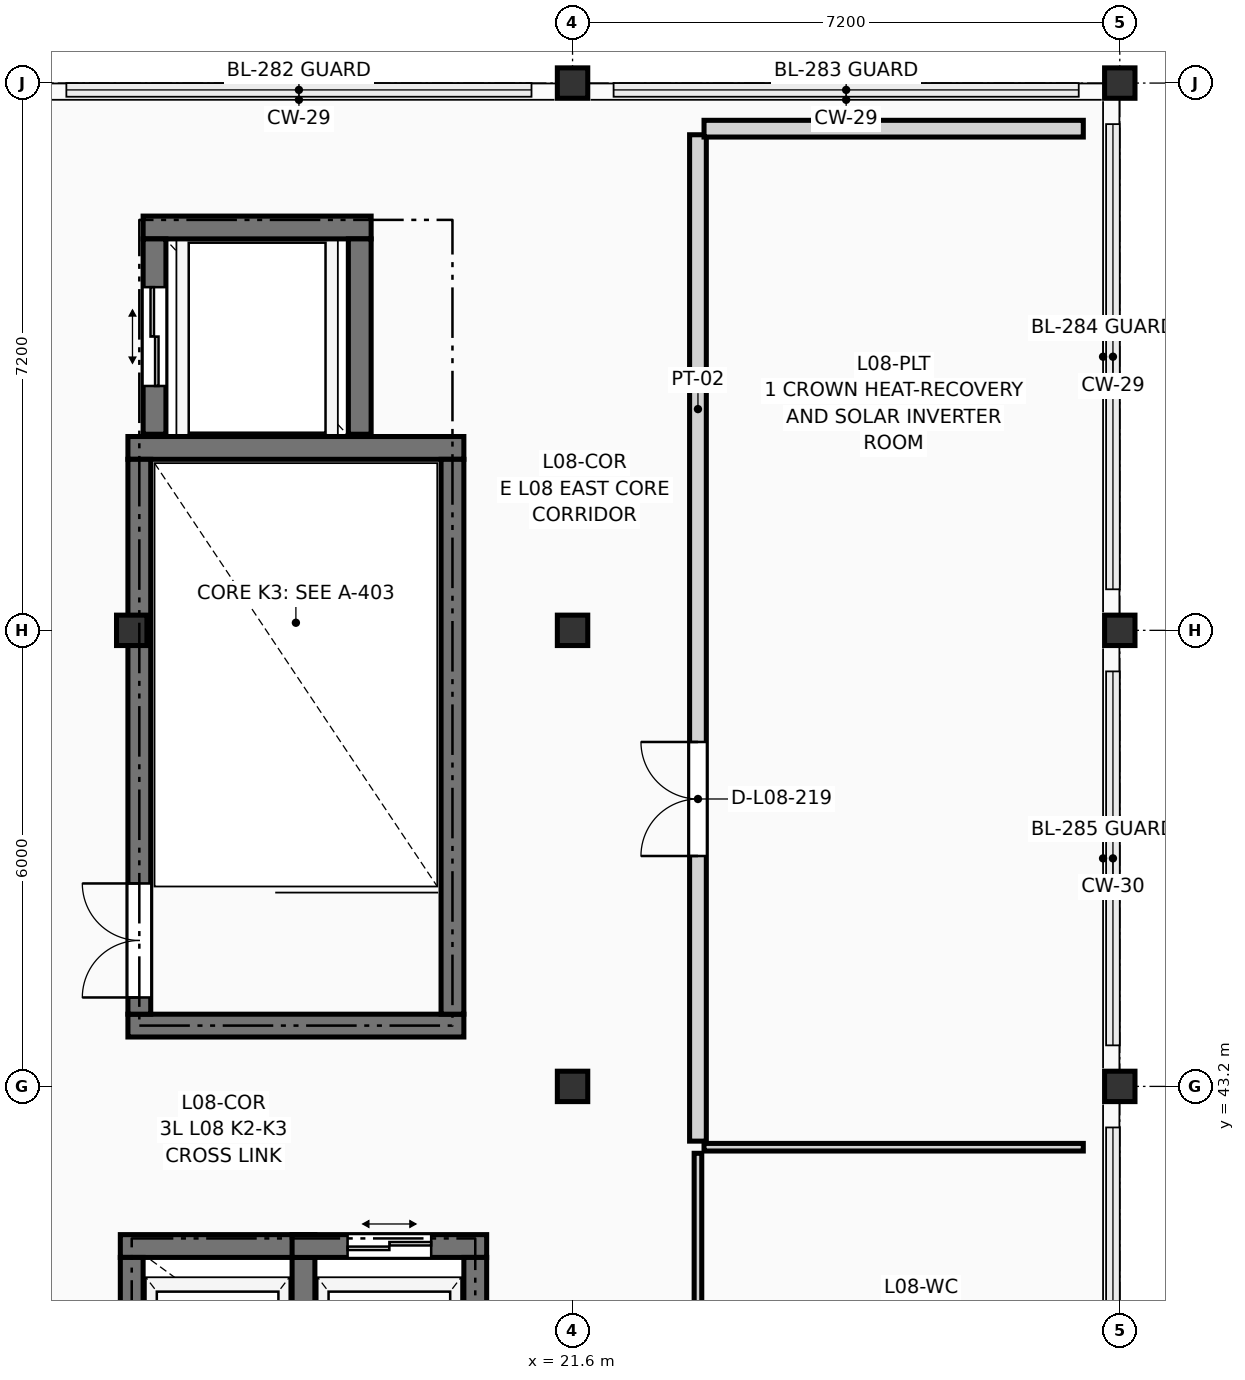
"""IFC4 building model, lengths in metres.
Left out: names, types, materials, properties, quantities, classifications, styles, units other than length and angle.
Written with IfcOpenShell. Run it as: python <this file> out.ifc"""

import sys

from ifc_helpers import new_model, si_unit, direction, frame, frame_2d, origin, origin_2d, place, context, subcontext, project, spatial, rectangle, extrude, element, fill, save


model = new_model("IFC4")
c1 = context("Model", 3, precision=1e-05, world=origin(), true_north=direction((0.0, 1.0)))
c2 = subcontext(c1, "Body", "Model", "MODEL_VIEW")
j1 = project(units=[si_unit("LENGTHUNIT", "METRE"), si_unit("PLANEANGLEUNIT", "RADIAN")], contexts=[c1])
p1 = place(None, origin())
s1 = spatial("IfcSite", under=j1, at=p1, CompositionType="ELEMENT")
p2 = place(p1, origin())
s2 = spatial("IfcBuilding", under=s1, at=p2, CompositionType="ELEMENT")
p3 = place(p2, frame((0.0, 0.0, 29.7)))
s3 = spatial("IfcBuildingStorey", under=s2, at=p3, CompositionType="ELEMENT", Elevation=29.7)
for number, where, z_axis, x_axis in (
    (1, (15.8, 49.2, 0.0), (0.0, 0.0, 1.0), (1.0, 0.0, 0.0)),
    (2, (21.6, 43.2, 0.0), (0.0, 0.0, 1.0), (1.0, 0.0, 0.0)),
    (3, (21.6, 49.2, 0.0), (0.0, 0.0, 1.0), (1.0, 0.0, 0.0)),
    (4, (21.6, 56.4, 0.0), (0.0, 0.0, 1.0), (1.0, 0.0, 0.0)),
    (5, (28.8, 43.2, 0.0), (0.0, 0.0, 1.0), (1.0, 0.0, 0.0)),
    (6, (28.8, 49.2, 0.0), (0.0, 0.0, 1.0), (1.0, 0.0, 0.0)),
    (7, (28.8, 56.4, 0.0), (0.0, 0.0, 1.0), (1.0, 0.0, 0.0)),
):
    element("IfcColumn", number, at=place(p3, frame(where, z_axis=z_axis, x_axis=x_axis)), inside=s3, PredefinedType="COLUMN", context=c2, shape_type="SweptSolid", body=[
        extrude(rectangle(XDim=0.4, YDim=0.4, at=origin_2d()), origin(), (0.0, 0.0, 1.0), 3.6),
    ])
for number, where, z_axis, x_axis in (
    (8, (15.75, 44.0, 0.0), (0.0, 0.0, 1.0), (1.0, 0.0, 0.0)),
    (9, (15.75, 51.6, 0.0), (0.0, 0.0, 1.0), (1.0, 0.0, 0.0)),
):
    element("IfcWall", number, at=place(p3, frame(where, z_axis=z_axis, x_axis=x_axis)), inside=s3, PredefinedType="SHEAR", context=c2, shape_type="SweptSolid", body=[
        extrude(rectangle(XDim=4.42, YDim=0.3, at=frame_2d((2.21, 0.0))), origin(), (0.0, 0.0, 1.0), 3.4),
    ])
p4 = place(p3, frame((15.9, 44.15, 0.0), z_axis=(0.0, 0.0, 1.0), x_axis=(0.0, 1.0, 0.0)))
e10 = element("IfcWall", 10, at=p4, inside=s3, PredefinedType="SHEAR", context=c2, shape_type="SweptSolid", body=[
    extrude(rectangle(XDim=7.3, YDim=0.3, at=frame_2d((3.65, 0.0))), origin(), (0.0, 0.0, 1.0), 3.4),
])
p5 = place(p4, frame((0.22, 0.0, 0.0)))
e11 = element("IfcOpeningElement", 11, at=p5, cuts=e10, PredefinedType="OPENING", context=c2, shape_type="SweptSolid", body=[
    extrude(rectangle(XDim=1.5, YDim=2.2, at=frame_2d((0.75, 1.1))), frame((0.0, 0.162, 0.0), z_axis=(0.0, -1.0, 0.0), x_axis=(1.0, 0.0, 0.0)), (0.0, 0.0, 1.0), 0.324),
])
p6 = place(p3, frame((20.02, 44.15, 0.0), z_axis=(0.0, 0.0, 1.0), x_axis=(0.0, 1.0, 0.0)))
e12 = element("IfcWall", 12, at=p6, inside=s3, PredefinedType="SHEAR", context=c2, shape_type="SweptSolid", body=[
    extrude(rectangle(XDim=7.3, YDim=0.3, at=frame_2d((3.65, 0.0))), origin(), (0.0, 0.0, 1.0), 3.4),
])
p7 = place(p3, frame((15.65, 41.1, 0.0), z_axis=(0.0, 0.0, 1.0), x_axis=(1.0, 0.0, 0.0)))
e13 = element("IfcWall", 13, at=p7, inside=s3, PredefinedType="SHEAR", context=c2, shape_type="SweptSolid", body=[
    extrude(rectangle(XDim=2.56, YDim=0.3, at=frame_2d((1.28, 0.0))), origin(), (0.0, 0.0, 1.0), 3.4),
])
p8 = place(p3, frame((15.8, 37.98, 0.0), z_axis=(0.0, 0.0, 1.0), x_axis=(0.0, 1.0, 0.0)))
e14 = element("IfcWall", 14, at=p8, inside=s3, PredefinedType="SHEAR", context=c2, shape_type="SweptSolid", body=[
    extrude(rectangle(XDim=2.97, YDim=0.3, at=frame_2d((1.485, 0.0))), origin(), (0.0, 0.0, 1.0), 3.4),
])
p9 = place(p8, frame((0.935, 0.0, 0.0)))
e15 = element("IfcOpeningElement", 15, at=p9, cuts=e14, PredefinedType="OPENING", context=c2, shape_type="SweptSolid", body=[
    extrude(rectangle(XDim=1.1, YDim=2.2, at=frame_2d((0.55, 1.1))), frame((0.0, 0.162, 0.0), z_axis=(0.0, -1.0, 0.0), x_axis=(1.0, 0.0, 0.0)), (0.0, 0.0, 1.0), 0.324),
])
p10 = place(p3, frame((18.06, 37.98, 0.0), z_axis=(0.0, 0.0, 1.0), x_axis=(0.0, 1.0, 0.0)))
e16 = element("IfcWall", 16, at=p10, inside=s3, PredefinedType="SHEAR", context=c2, shape_type="SweptSolid", body=[
    extrude(rectangle(XDim=2.97, YDim=0.3, at=frame_2d((1.485, 0.0))), origin(), (0.0, 0.0, 1.0), 3.4),
])
p11 = place(p3, frame((17.91, 41.1, 0.0), z_axis=(0.0, 0.0, 1.0), x_axis=(1.0, 0.0, 0.0)))
e17 = element("IfcWall", 17, at=p11, inside=s3, PredefinedType="SHEAR", context=c2, shape_type="SweptSolid", body=[
    extrude(rectangle(XDim=2.56, YDim=0.3, at=frame_2d((1.28, 0.0))), origin(), (0.0, 0.0, 1.0), 3.4),
])
p12 = place(p11, frame((0.73, 0.0, 0.0)))
e18 = element("IfcOpeningElement", 18, at=p12, cuts=e17, PredefinedType="OPENING", context=c2, shape_type="SweptSolid", body=[
    extrude(rectangle(XDim=1.1, YDim=2.2, at=frame_2d((0.55, 1.1))), frame((0.0, 0.162, 0.0), z_axis=(0.0, -1.0, 0.0), x_axis=(1.0, 0.0, 0.0)), (0.0, 0.0, 1.0), 0.324),
])
p13 = place(p3, frame((20.32, 37.98, 0.0), z_axis=(0.0, 0.0, 1.0), x_axis=(0.0, 1.0, 0.0)))
e19 = element("IfcWall", 19, at=p13, inside=s3, PredefinedType="SHEAR", context=c2, shape_type="SweptSolid", body=[
    extrude(rectangle(XDim=2.97, YDim=0.3, at=frame_2d((1.485, 0.0))), origin(), (0.0, 0.0, 1.0), 3.4),
])
p14 = place(p3, frame((15.95, 54.5, 0.0), z_axis=(0.0, 0.0, 1.0), x_axis=(1.0, 0.0, 0.0)))
e20 = element("IfcWall", 20, at=p14, inside=s3, PredefinedType="SHEAR", context=c2, shape_type="SweptSolid", body=[
    extrude(rectangle(XDim=3.0, YDim=0.3, at=frame_2d((1.5, 0.0))), origin(), (0.0, 0.0, 1.0), 3.4),
])
p15 = place(p3, frame((16.1, 51.78, 0.0), z_axis=(0.0, 0.0, 1.0), x_axis=(0.0, 1.0, 0.0)))
e21 = element("IfcWall", 21, at=p15, inside=s3, PredefinedType="SHEAR", context=c2, shape_type="SweptSolid", body=[
    extrude(rectangle(XDim=2.57, YDim=0.3, at=frame_2d((1.285, 0.0))), origin(), (0.0, 0.0, 1.0), 3.4),
])
p16 = place(p15, frame((0.635, 0.0, 0.0)))
e22 = element("IfcOpeningElement", 22, at=p16, cuts=e21, PredefinedType="OPENING", context=c2, shape_type="SweptSolid", body=[
    extrude(rectangle(XDim=1.3, YDim=2.25, at=frame_2d((0.65, 1.125))), frame((0.0, 0.162, 0.0), z_axis=(0.0, -1.0, 0.0), x_axis=(1.0, 0.0, 0.0)), (0.0, 0.0, 1.0), 0.324),
])
p17 = place(p3, frame((18.8, 51.78, 0.0), z_axis=(0.0, 0.0, 1.0), x_axis=(0.0, 1.0, 0.0)))
e23 = element("IfcWall", 23, at=p17, inside=s3, PredefinedType="SHEAR", context=c2, shape_type="SweptSolid", body=[
    extrude(rectangle(XDim=2.57, YDim=0.3, at=frame_2d((1.285, 0.0))), origin(), (0.0, 0.0, 1.0), 3.4),
])
p18 = place(p3, frame((23.25, 35.88, 0.0), z_axis=(0.0, 0.0, 1.0), x_axis=(0.0, 1.0, 0.0)))
e24 = element("IfcWall", 24, at=p18, inside=s3, PredefinedType="PARTITIONING", context=c2, shape_type="SweptSolid", body=[
    extrude(rectangle(XDim=6.44, YDim=0.1, at=frame_2d((3.22, 0.0))), origin(), (0.0, 0.0, 1.0), 3.385),
])
p19 = place(p18, frame((2.77, 0.0, 0.0)))
e25 = element("IfcOpeningElement", 25, at=p19, cuts=e24, PredefinedType="OPENING", context=c2, shape_type="SweptSolid", body=[
    extrude(rectangle(XDim=0.9, YDim=2.1, at=frame_2d((0.45, 1.05))), frame((0.0, 0.062, 0.0), z_axis=(0.0, -1.0, 0.0), x_axis=(1.0, 0.0, 0.0)), (0.0, 0.0, 1.0), 0.124),
])
p20 = place(p3, frame((23.33, 42.4, 0.0), z_axis=(0.0, 0.0, 1.0), x_axis=(1.0, 0.0, 0.0)))
e26 = element("IfcWall", 26, at=p20, inside=s3, PredefinedType="PARTITIONING", context=c2, shape_type="SweptSolid", body=[
    extrude(rectangle(XDim=4.99, YDim=0.1, at=frame_2d((2.495, 0.0))), origin(), (0.0, 0.0, 1.0), 3.385),
])
p21 = place(p3, frame((23.25, 42.48, 0.0), z_axis=(0.0, 0.0, 1.0), x_axis=(0.0, 1.0, 0.0)))
e27 = element("IfcWall", 27, at=p21, inside=s3, PredefinedType="PARTITIONING", context=c2, shape_type="SweptSolid", body=[
    extrude(rectangle(XDim=13.24, YDim=0.22, at=frame_2d((6.62, 0.0))), origin(), (0.0, 0.0, 1.0), 3.385),
])
p22 = place(p21, frame((3.751, 0.0, 0.0)))
e28 = element("IfcOpeningElement", 28, at=p22, cuts=e27, PredefinedType="OPENING", context=c2, shape_type="SweptSolid", body=[
    extrude(rectangle(XDim=1.5, YDim=2.25, at=frame_2d((0.75, 1.125))), frame((0.0, 0.122, 0.0), z_axis=(0.0, -1.0, 0.0), x_axis=(1.0, 0.0, 0.0)), (0.0, 0.0, 1.0), 0.244),
])
p23 = place(p3, frame((23.33, 55.8, 0.0), z_axis=(0.0, 0.0, 1.0), x_axis=(1.0, 0.0, 0.0)))
e29 = element("IfcWall", 29, at=p23, inside=s3, PredefinedType="PARTITIONING", context=c2, shape_type="SweptSolid", body=[
    extrude(rectangle(XDim=4.99, YDim=0.22, at=frame_2d((2.495, 0.0))), origin(), (0.0, 0.0, 1.0), 3.385),
])
p24 = place(p5, origin())
e30 = element("IfcDoor", 30, at=p24, inside=s3, OperationType="DOUBLE_DOOR_SINGLE_SWING", PredefinedType="DOOR", context=c2, shape_type="SweptSolid", body=[
    extrude(rectangle(XDim=1.5, YDim=2.2, at=frame_2d((0.75, 1.1))), frame((0.0, 0.025, 0.0), z_axis=(0.0, -1.0, 0.0), x_axis=(1.0, 0.0, 0.0)), (0.0, 0.0, 1.0), 0.05),
])
fill(e11, e30)
p25 = place(p12, origin())
e31 = element("IfcDoor", 31, at=p25, inside=s3, OperationType="DOUBLE_DOOR_SLIDING", PredefinedType="DOOR", context=c2, shape_type="SweptSolid", body=[
    extrude(rectangle(XDim=1.1, YDim=2.2, at=frame_2d((0.55, 1.1))), frame((0.0, 0.025, 0.0), z_axis=(0.0, -1.0, 0.0), x_axis=(1.0, 0.0, 0.0)), (0.0, 0.0, 1.0), 0.05),
])
fill(e18, e31)
p26 = place(p16, origin())
e32 = element("IfcDoor", 32, at=p26, inside=s3, OperationType="DOUBLE_DOOR_SLIDING", PredefinedType="DOOR", context=c2, shape_type="SweptSolid", body=[
    extrude(rectangle(XDim=1.3, YDim=2.25, at=frame_2d((0.65, 1.125))), frame((0.0, 0.025, 0.0), z_axis=(0.0, -1.0, 0.0), x_axis=(1.0, 0.0, 0.0)), (0.0, 0.0, 1.0), 0.05),
])
fill(e22, e32)
p27 = place(p22, origin())
e33 = element("IfcDoor", 33, at=p27, inside=s3, OperationType="DOUBLE_DOOR_SINGLE_SWING", PredefinedType="DOOR", context=c2, shape_type="SweptSolid", body=[
    extrude(rectangle(XDim=1.5, YDim=2.25, at=frame_2d((0.75, 1.125))), frame((0.0, 0.025, 0.0), z_axis=(0.0, -1.0, 0.0), x_axis=(1.0, 0.0, 0.0)), (0.0, 0.0, 1.0), 0.05),
])
fill(e28, e33)
save(model, sys.argv[1])
